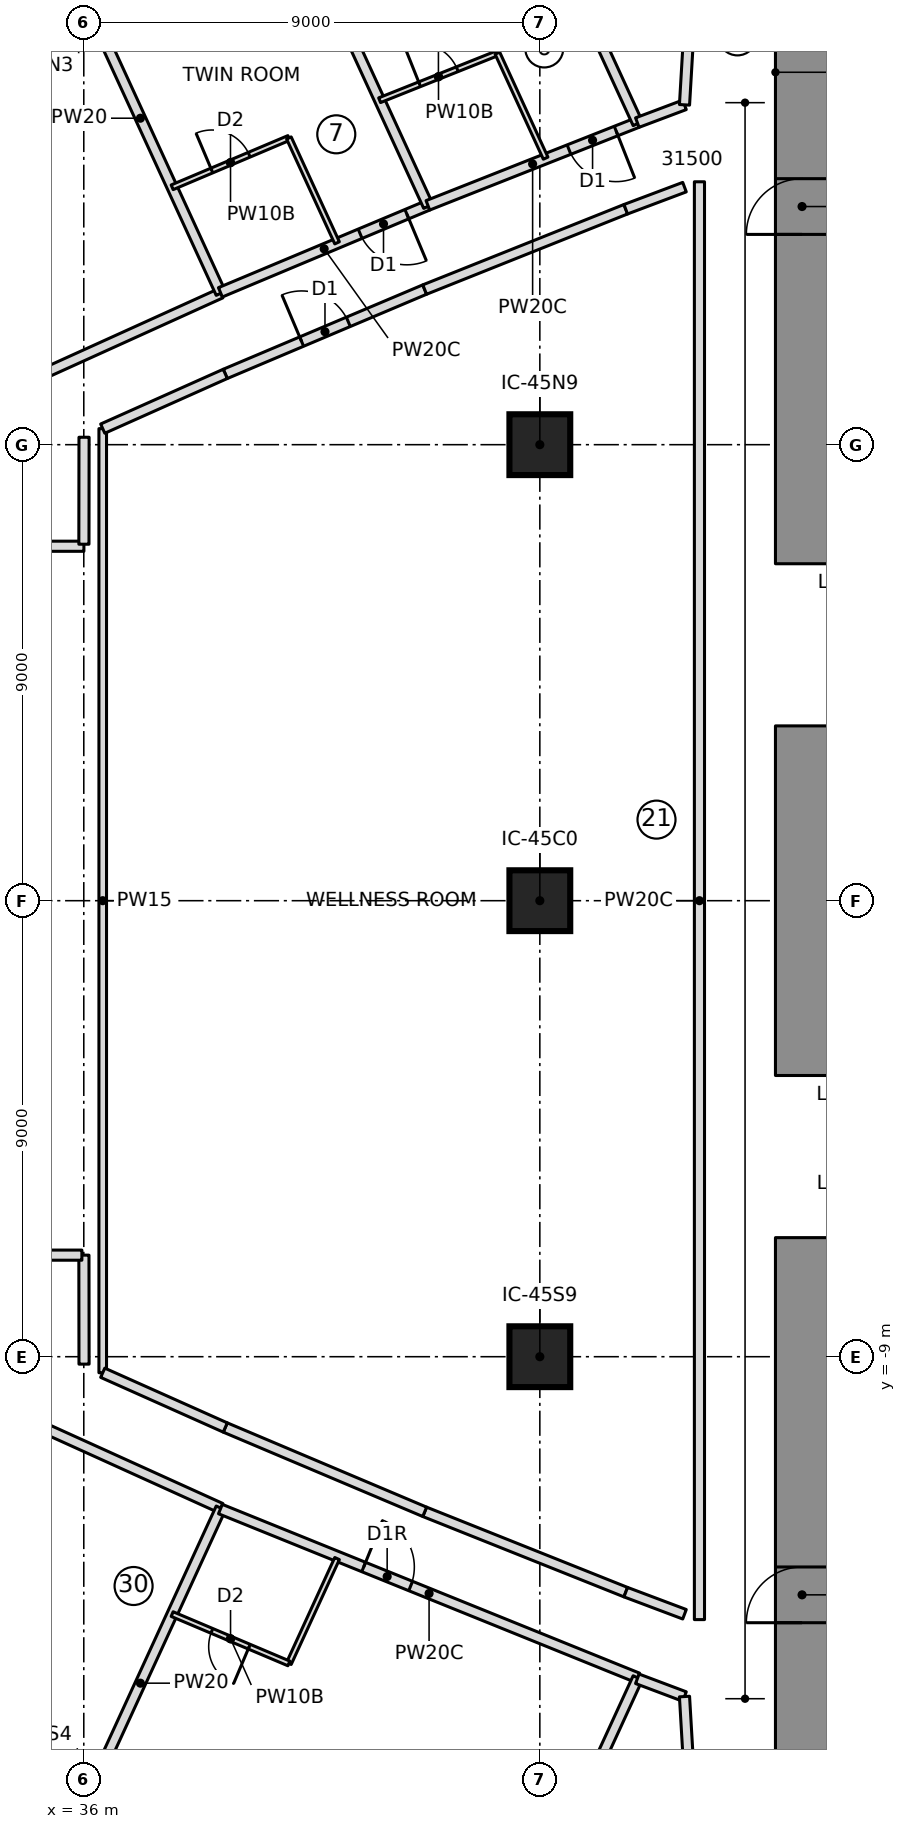
"""IFC4 building model, lengths in metres.
Left out: names, types, materials, properties, quantities, classifications, styles, units other than length and angle.
Written with IfcOpenShell. Run it as: python <this file> out.ifc"""

import sys

from ifc_helpers import new_model, si_unit, direction, frame, frame_2d, origin, origin_2d, place, context, subcontext, project, spatial, rectangle, extrude, element, fill, save


model = new_model("IFC4")
c1 = context("Model", 3, precision=1e-05, world=origin(), true_north=direction((0.0, 1.0)))
c2 = subcontext(c1, "Body", "Model", "MODEL_VIEW")
j1 = project(units=[si_unit("LENGTHUNIT", "METRE"), si_unit("PLANEANGLEUNIT", "RADIAN")], contexts=[c1])
p1 = place(None, origin())
s1 = spatial("IfcSite", under=j1, at=p1, CompositionType="ELEMENT")
p2 = place(p1, origin())
s2 = spatial("IfcBuilding", under=s1, at=p2, CompositionType="ELEMENT")
p3 = place(p2, frame((0.0, 0.0, 95.55)))
s3 = spatial("IfcBuildingStorey", under=s2, at=p3, CompositionType="ELEMENT", Elevation=95.55)
p4 = place(p3, frame((50.175, 6.65, 0.0), z_axis=(0.0, 0.0, 1.0), x_axis=(0.0, 1.0, 0.0)))
e1 = element("IfcWall", 1, at=p4, inside=s3, PredefinedType="SHEAR", context=c2, shape_type="SweptSolid", body=[
    extrude(rectangle(XDim=10.15, YDim=1.05, at=frame_2d((5.075, 0.0))), origin(), (0.0, 0.0, 1.0), 3.55),
])
p5 = place(p4, frame((6.5, 0.0, 0.0)))
e2 = element("IfcOpeningElement", 2, at=p5, cuts=e1, PredefinedType="OPENING", context=c2, shape_type="SweptSolid", body=[
    extrude(rectangle(XDim=1.1, YDim=2.1, at=frame_2d((0.55, 1.05))), frame((0.0, 0.535, 0.0), z_axis=(0.0, -1.0, 0.0), x_axis=(1.0, 0.0, 0.0)), (0.0, 0.0, 1.0), 1.07),
])
p6 = place(p3, frame((50.175, -3.45, 0.0), z_axis=(0.0, 0.0, 1.0), x_axis=(0.0, 1.0, 0.0)))
e3 = element("IfcWall", 3, at=p6, inside=s3, PredefinedType="SHEAR", context=c2, shape_type="SweptSolid", body=[
    extrude(rectangle(XDim=6.9, YDim=1.05, at=frame_2d((3.45, 0.0))), origin(), (0.0, 0.0, 1.0), 3.55),
])
p7 = place(p3, frame((50.175, -16.8, 0.0), z_axis=(0.0, 0.0, 1.0), x_axis=(0.0, 1.0, 0.0)))
e4 = element("IfcWall", 4, at=p7, inside=s3, PredefinedType="SHEAR", context=c2, shape_type="SweptSolid", body=[
    extrude(rectangle(XDim=10.15, YDim=1.05, at=frame_2d((5.075, 0.0))), origin(), (0.0, 0.0, 1.0), 3.55),
])
p8 = place(p7, frame((2.55, 0.0, 0.0)))
e5 = element("IfcOpeningElement", 5, at=p8, cuts=e4, PredefinedType="OPENING", context=c2, shape_type="SweptSolid", body=[
    extrude(rectangle(XDim=1.1, YDim=2.1, at=frame_2d((0.55, 1.05))), frame((0.0, 0.535, 0.0), z_axis=(0.0, -1.0, 0.0), x_axis=(1.0, 0.0, 0.0)), (0.0, 0.0, 1.0), 1.07),
])
for number, where, z_axis, x_axis in (
    (6, (45.0, -9.0, 0.0), (0.0, 0.0, 1.0), (1.0, 0.0, 0.0)),
    (7, (45.0, 0.0, 0.0), (0.0, 0.0, 1.0), (1.0, 0.0, 0.0)),
    (8, (45.0, 9.0, 0.0), (0.0, 0.0, 1.0), (1.0, 0.0, 0.0)),
):
    element("IfcColumn", number, at=place(p3, frame(where, z_axis=z_axis, x_axis=x_axis)), inside=s3, PredefinedType="COLUMN", context=c2, shape_type="SweptSolid", body=[
        extrude(rectangle(XDim=1.2, YDim=1.2, at=origin_2d()), origin(), (0.0, 0.0, 1.0), 3.55),
    ])
p9 = place(p3, frame((30.614, 8.32, 0.0), z_axis=(0.0, 0.0, 1.0), x_axis=(0.910751030363, 0.41295588226, 0.0)))
e9 = element("IfcWall", 9, at=p9, inside=s3, PredefinedType="PARTITIONING", context=c2, shape_type="SweptSolid", body=[
    extrude(rectangle(XDim=8.883, YDim=0.2, at=frame_2d((4.442, 0.0))), origin(), (0.0, 0.0, 1.0), 3.25),
])
p10 = place(p9, frame((0.45, 0.0, 0.0)))
e10 = element("IfcOpeningElement", 10, at=p10, cuts=e9, PredefinedType="OPENING", context=c2, shape_type="SweptSolid", body=[
    extrude(rectangle(XDim=1.0, YDim=2.1, at=frame_2d((0.5, 1.05))), frame((0.0, 0.11, 0.0), z_axis=(0.0, -1.0, 0.0), x_axis=(1.0, 0.0, 0.0)), (0.0, 0.0, 1.0), 0.22),
])
p11 = place(p3, frame((38.704, 11.989, 0.0), z_axis=(0.0, 0.0, 1.0), x_axis=(-0.417416334044, 0.908715359215, 0.0)))
e11 = element("IfcWall", 11, at=p11, inside=s3, PredefinedType="PARTITIONING", context=c2, shape_type="SweptSolid", body=[
    extrude(rectangle(XDim=7.604, YDim=0.2, at=frame_2d((3.802, 0.0))), origin(), (0.0, 0.0, 1.0), 3.25),
])
p12 = place(p3, frame((42.791, 13.724, 0.0), z_axis=(0.0, 0.0, 1.0), x_axis=(-0.922230433067, -0.386640696675, 0.0)))
e12 = element("IfcWall", 12, at=p12, inside=s3, PredefinedType="PARTITIONING", context=c2, shape_type="SweptSolid", body=[
    extrude(rectangle(XDim=4.44, YDim=0.2, at=frame_2d((2.22, 0.0))), origin(), (0.0, 0.0, 1.0), 3.25),
])
p13 = place(p12, frame((0.45, 0.0, 0.0)))
e13 = element("IfcOpeningElement", 13, at=p13, cuts=e12, PredefinedType="OPENING", context=c2, shape_type="SweptSolid", body=[
    extrude(rectangle(XDim=1.0, YDim=2.1, at=frame_2d((0.5, 1.05))), frame((0.0, 0.11, 0.0), z_axis=(0.0, -1.0, 0.0), x_axis=(1.0, 0.0, 0.0)), (0.0, 0.0, 1.0), 0.22),
])
p14 = place(p3, frame((37.744, 14.08, 0.0), z_axis=(0.0, 0.0, 1.0), x_axis=(0.921042675983, 0.38946166566, 0.0)))
e14 = element("IfcWall", 14, at=p14, inside=s3, PredefinedType="PARTITIONING", context=c2, shape_type="SweptSolid", body=[
    extrude(rectangle(XDim=2.501, YDim=0.1, at=frame_2d((1.25, 0.0))), origin(), (0.0, 0.0, 1.0), 3.25),
])
p15 = place(p14, frame((0.85, 0.0, 0.0)))
e15 = element("IfcOpeningElement", 15, at=p15, cuts=e14, PredefinedType="OPENING", context=c2, shape_type="SweptSolid", body=[
    extrude(rectangle(XDim=0.8, YDim=2.1, at=frame_2d((0.4, 1.05))), frame((0.0, 0.06, 0.0), z_axis=(0.0, -1.0, 0.0), x_axis=(1.0, 0.0, 0.0)), (0.0, 0.0, 1.0), 0.12),
])
p16 = place(p3, frame((40.048, 15.054, 0.0), z_axis=(0.0, 0.0, 1.0), x_axis=(0.417433204355, -0.908707609686, 0.0)))
e16 = element("IfcWall", 16, at=p16, inside=s3, PredefinedType="PARTITIONING", context=c2, shape_type="SweptSolid", body=[
    extrude(rectangle(XDim=2.278, YDim=0.1, at=frame_2d((1.139, 0.0))), origin(), (0.0, 0.0, 1.0), 3.25),
])
p17 = place(p3, frame((42.799, 13.705, 0.0), z_axis=(0.0, 0.0, 1.0), x_axis=(-0.417427858403, 0.908710065438, 0.0)))
e17 = element("IfcWall", 17, at=p17, inside=s3, PredefinedType="PARTITIONING", context=c2, shape_type="SweptSolid", body=[
    extrude(rectangle(XDim=7.61, YDim=0.2, at=frame_2d((3.805, 0.0))), origin(), (0.0, 0.0, 1.0), 3.25),
])
p18 = place(p3, frame((46.924, 15.357, 0.0), z_axis=(0.0, 0.0, 1.0), x_axis=(-0.930040633249, -0.367456692014, 0.0)))
e18 = element("IfcWall", 18, at=p18, inside=s3, PredefinedType="PARTITIONING", context=c2, shape_type="SweptSolid", body=[
    extrude(rectangle(XDim=4.444, YDim=0.2, at=frame_2d((2.222, 0.0))), origin(), (0.0, 0.0, 1.0), 3.25),
])
p19 = place(p18, frame((0.45, 0.0, 0.0)))
e19 = element("IfcOpeningElement", 19, at=p19, cuts=e18, PredefinedType="OPENING", context=c2, shape_type="SweptSolid", body=[
    extrude(rectangle(XDim=1.0, YDim=2.1, at=frame_2d((0.5, 1.05))), frame((0.0, 0.11, 0.0), z_axis=(0.0, -1.0, 0.0), x_axis=(1.0, 0.0, 0.0)), (0.0, 0.0, 1.0), 0.22),
])
p20 = place(p3, frame((41.838, 15.798, 0.0), z_axis=(0.0, 0.0, 1.0), x_axis=(0.928638024739, 0.370987087388, 0.0)))
e20 = element("IfcWall", 20, at=p20, inside=s3, PredefinedType="PARTITIONING", context=c2, shape_type="SweptSolid", body=[
    extrude(rectangle(XDim=2.503, YDim=0.1, at=frame_2d((1.252, 0.0))), origin(), (0.0, 0.0, 1.0), 3.25),
])
p21 = place(p20, frame((0.85, 0.0, 0.0)))
e21 = element("IfcOpeningElement", 21, at=p21, cuts=e20, PredefinedType="OPENING", context=c2, shape_type="SweptSolid", body=[
    extrude(rectangle(XDim=0.8, YDim=2.1, at=frame_2d((0.4, 1.05))), frame((0.0, 0.06, 0.0), z_axis=(0.0, -1.0, 0.0), x_axis=(1.0, 0.0, 0.0)), (0.0, 0.0, 1.0), 0.12),
])
p22 = place(p3, frame((44.163, 16.727, 0.0), z_axis=(0.0, 0.0, 1.0), x_axis=(0.417373525971, -0.908735021785, 0.0)))
e22 = element("IfcWall", 22, at=p22, inside=s3, PredefinedType="PARTITIONING", context=c2, shape_type="SweptSolid", body=[
    extrude(rectangle(XDim=2.28, YDim=0.1, at=frame_2d((1.14, 0.0))), origin(), (0.0, 0.0, 1.0), 3.25),
])
p23 = place(p3, frame((46.933, 15.339, 0.0), z_axis=(0.0, 0.0, 1.0), x_axis=(-0.417437957167, 0.908705426371, 0.0)))
e23 = element("IfcWall", 23, at=p23, inside=s3, PredefinedType="PARTITIONING", context=c2, shape_type="SweptSolid", body=[
    extrude(rectangle(XDim=7.619, YDim=0.2, at=frame_2d((3.81, 0.0))), origin(), (0.0, 0.0, 1.0), 3.25),
])
p24 = place(p3, frame((30.614, -8.32, 0.0), z_axis=(0.0, 0.0, 1.0), x_axis=(0.910751030363, -0.41295588226, 0.0)))
e24 = element("IfcWall", 24, at=p24, inside=s3, PredefinedType="PARTITIONING", context=c2, shape_type="SweptSolid", body=[
    extrude(rectangle(XDim=8.883, YDim=0.2, at=frame_2d((4.442, 0.0))), origin(), (0.0, 0.0, 1.0), 3.25),
])
p25 = place(p24, frame((0.45, 0.0, 0.0)))
e25 = element("IfcOpeningElement", 25, at=p25, cuts=e24, PredefinedType="OPENING", context=c2, shape_type="SweptSolid", body=[
    extrude(rectangle(XDim=1.0, YDim=2.1, at=frame_2d((0.5, 1.05))), frame((0.0, 0.11, 0.0), z_axis=(0.0, -1.0, 0.0), x_axis=(1.0, 0.0, 0.0)), (0.0, 0.0, 1.0), 0.22),
])
p26 = place(p3, frame((35.531, -18.898, 0.0), z_axis=(0.0, 0.0, 1.0), x_axis=(0.417416334044, 0.908715359215, 0.0)))
e26 = element("IfcWall", 26, at=p26, inside=s3, PredefinedType="PARTITIONING", context=c2, shape_type="SweptSolid", body=[
    extrude(rectangle(XDim=7.604, YDim=0.2, at=frame_2d((3.802, 0.0))), origin(), (0.0, 0.0, 1.0), 3.25),
])
p27 = place(p3, frame((38.696, -12.007, 0.0), z_axis=(0.0, 0.0, 1.0), x_axis=(0.927027566285, -0.374993188401, 0.0)))
e27 = element("IfcWall", 27, at=p27, inside=s3, PredefinedType="PARTITIONING", context=c2, shape_type="SweptSolid", body=[
    extrude(rectangle(XDim=8.885, YDim=0.2, at=frame_2d((4.442, 0.0))), origin(), (0.0, 0.0, 1.0), 3.25),
])
p28 = place(p27, frame((3.05, 0.0, 0.0)))
e28 = element("IfcOpeningElement", 28, at=p28, cuts=e27, PredefinedType="OPENING", context=c2, shape_type="SweptSolid", body=[
    extrude(rectangle(XDim=1.0, YDim=2.1, at=frame_2d((0.5, 1.05))), frame((0.0, 0.11, 0.0), z_axis=(0.0, -1.0, 0.0), x_axis=(1.0, 0.0, 0.0)), (0.0, 0.0, 1.0), 0.22),
])
p29 = place(p3, frame((40.999, -12.984, 0.0), z_axis=(0.0, 0.0, 1.0), x_axis=(-0.417433204355, -0.908707609686, 0.0)))
e29 = element("IfcWall", 29, at=p29, inside=s3, PredefinedType="PARTITIONING", context=c2, shape_type="SweptSolid", body=[
    extrude(rectangle(XDim=2.278, YDim=0.1, at=frame_2d((1.139, 0.0))), origin(), (0.0, 0.0, 1.0), 3.25),
])
p30 = place(p3, frame((40.048, -15.054, 0.0), z_axis=(0.0, 0.0, 1.0), x_axis=(-0.921042675983, 0.38946166566, 0.0)))
e30 = element("IfcWall", 30, at=p30, inside=s3, PredefinedType="PARTITIONING", context=c2, shape_type="SweptSolid", body=[
    extrude(rectangle(XDim=2.501, YDim=0.1, at=frame_2d((1.25, 0.0))), origin(), (0.0, 0.0, 1.0), 3.25),
])
p31 = place(p30, frame((0.85, 0.0, 0.0)))
e31 = element("IfcOpeningElement", 31, at=p31, cuts=e30, PredefinedType="OPENING", context=c2, shape_type="SweptSolid", body=[
    extrude(rectangle(XDim=0.8, YDim=2.1, at=frame_2d((0.4, 1.05))), frame((0.0, 0.06, 0.0), z_axis=(0.0, -1.0, 0.0), x_axis=(1.0, 0.0, 0.0)), (0.0, 0.0, 1.0), 0.12),
])
p32 = place(p3, frame((43.752, -22.262, 0.0), z_axis=(0.0, 0.0, 1.0), x_axis=(0.417437957167, 0.908705426371, 0.0)))
e32 = element("IfcWall", 32, at=p32, inside=s3, PredefinedType="PARTITIONING", context=c2, shape_type="SweptSolid", body=[
    extrude(rectangle(XDim=7.619, YDim=0.2, at=frame_2d((3.81, 0.0))), origin(), (0.0, 0.0, 1.0), 3.25),
])
p33 = place(p3, frame((36.374, -9.317, 0.0), z_axis=(0.0, 0.0, 1.0), x_axis=(0.0, 1.0, 0.0)))
e33 = element("IfcWall", 33, at=p33, inside=s3, PredefinedType="PARTITIONING", context=c2, shape_type="SweptSolid", body=[
    extrude(rectangle(XDim=18.634, YDim=0.15, at=frame_2d((9.317, 0.0))), origin(), (0.0, 0.0, 1.0), 3.25),
])
p34 = place(p3, frame((38.792, 10.397, 0.0), z_axis=(0.0, 0.0, 1.0), x_axis=(0.921037415532, 0.389474105929, 0.0)))
e34 = element("IfcWall", 34, at=p34, inside=s3, PredefinedType="PARTITIONING", context=c2, shape_type="SweptSolid", body=[
    extrude(rectangle(XDim=4.273, YDim=0.2, at=frame_2d((2.137, 0.0))), origin(), (0.0, 0.0, 1.0), 3.25),
])
p35 = place(p34, frame((1.636, 0.0, 0.0)))
e35 = element("IfcOpeningElement", 35, at=p35, cuts=e34, PredefinedType="OPENING", context=c2, shape_type="SweptSolid", body=[
    extrude(rectangle(XDim=1.0, YDim=2.1, at=frame_2d((0.5, 1.05))), frame((0.0, 0.11, 0.0), z_axis=(0.0, -1.0, 0.0), x_axis=(1.0, 0.0, 0.0)), (0.0, 0.0, 1.0), 0.22),
])
for number, where, z_axis, x_axis in (
    (36, (42.728, 12.062, 0.0), (0.0, 0.0, 1.0), (0.929, 0.371, 0.0)),
    (37, (46.696, -13.647, 0.0), (0.0, 0.0, 1.0), (-0.929, 0.371, 0.0)),
):
    element("IfcWall", number, at=place(p3, frame(where, z_axis=z_axis, x_axis=x_axis)), inside=s3, PredefinedType="PARTITIONING", context=c2, shape_type="SweptSolid", body=[
        extrude(rectangle(XDim=4.273, YDim=0.2, at=frame_2d((2.136, 0.0))), origin(), (0.0, 0.0, 1.0), 3.25),
    ])
p36 = place(p3, frame((42.728, -12.062, 0.0), z_axis=(0.0, 0.0, 1.0), x_axis=(-0.921037415532, 0.389474105929, 0.0)))
e38 = element("IfcWall", 38, at=p36, inside=s3, PredefinedType="PARTITIONING", context=c2, shape_type="SweptSolid", body=[
    extrude(rectangle(XDim=4.273, YDim=0.2, at=frame_2d((2.137, 0.0))), origin(), (0.0, 0.0, 1.0), 3.25),
])
for number, where, z_axis, x_axis in (
    (39, (38.792, -10.397, 0.0), (0.0, 0.0, 1.0), (-0.913, 0.408, 0.0)),
    (40, (36.374, 9.317, 0.0), (0.0, 0.0, 1.0), (0.913, 0.408, 0.0)),
):
    element("IfcWall", number, at=place(p3, frame(where, z_axis=z_axis, x_axis=x_axis)), inside=s3, PredefinedType="PARTITIONING", context=c2, shape_type="SweptSolid", body=[
        extrude(rectangle(XDim=2.648, YDim=0.2, at=frame_2d((1.324, 0.0))), origin(), (0.0, 0.0, 1.0), 3.25),
    ])
for number, where, z_axis, x_axis in (
    (41, (47.855, 15.707, 0.0), (0.0, 0.0, 1.0), (-0.936, -0.353, 0.0)),
    (42, (46.924, -15.357, 0.0), (0.0, 0.0, 1.0), (0.936, -0.353, 0.0)),
):
    element("IfcWall", number, at=place(p3, frame(where, z_axis=z_axis, x_axis=x_axis)), inside=s3, PredefinedType="PARTITIONING", context=c2, shape_type="SweptSolid", body=[
        extrude(rectangle(XDim=0.995, YDim=0.2, at=frame_2d((0.497, 0.0))), origin(), (0.0, 0.0, 1.0), 3.25),
    ])
for number, where, z_axis, x_axis in (
    (43, (46.696, 13.647, 0.0), (0.0, 0.0, 1.0), (0.936, 0.352, 0.0)),
    (44, (47.855, -14.083, 0.0), (0.0, 0.0, 1.0), (-0.936, 0.352, 0.0)),
):
    element("IfcWall", number, at=place(p3, frame(where, z_axis=z_axis, x_axis=x_axis)), inside=s3, PredefinedType="PARTITIONING", context=c2, shape_type="SweptSolid", body=[
        extrude(rectangle(XDim=1.239, YDim=0.2, at=frame_2d((0.619, 0.0))), origin(), (0.0, 0.0, 1.0), 3.25),
    ])
p37 = place(p3, frame((48.146, 20.652, 0.0), z_axis=(0.0, 0.0, 1.0), x_axis=(-0.058649792989, -0.998278619315, 0.0)))
e45 = element("IfcWall", 45, at=p37, inside=s3, PredefinedType="PARTITIONING", context=c2, shape_type="SweptSolid", body=[
    extrude(rectangle(XDim=4.954, YDim=0.2, at=frame_2d((2.477, 0.0))), origin(), (0.0, 0.0, 1.0), 3.25),
])
p38 = place(p37, frame((1.977, 0.0, 0.0)))
e46 = element("IfcOpeningElement", 46, at=p38, cuts=e45, PredefinedType="OPENING", context=c2, shape_type="SweptSolid", body=[
    extrude(rectangle(XDim=1.0, YDim=2.1, at=frame_2d((0.5, 1.05))), frame((0.0, 0.11, 0.0), z_axis=(0.0, -1.0, 0.0), x_axis=(1.0, 0.0, 0.0)), (0.0, 0.0, 1.0), 0.22),
])
p39 = place(p3, frame((47.855, -15.707, 0.0), z_axis=(0.0, 0.0, 1.0), x_axis=(0.058568850083, -0.998283371493, 0.0)))
e47 = element("IfcWall", 47, at=p39, inside=s3, PredefinedType="PARTITIONING", context=c2, shape_type="SweptSolid", body=[
    extrude(rectangle(XDim=4.952, YDim=0.2, at=frame_2d((2.476, 0.0))), origin(), (0.0, 0.0, 1.0), 3.25),
])
p40 = place(p39, frame((1.976, 0.0, 0.0)))
e48 = element("IfcOpeningElement", 48, at=p40, cuts=e47, PredefinedType="OPENING", context=c2, shape_type="SweptSolid", body=[
    extrude(rectangle(XDim=1.0, YDim=2.1, at=frame_2d((0.5, 1.05))), frame((0.0, 0.11, 0.0), z_axis=(0.0, -1.0, 0.0), x_axis=(1.0, 0.0, 0.0)), (0.0, 0.0, 1.0), 0.22),
])
p41 = place(p3, frame((36.005, -9.146, 0.0), z_axis=(0.0, 0.0, 1.0), x_axis=(-0.001135073049, 0.999999355804, 0.0)))
e49 = element("IfcWall", 49, at=p41, inside=s3, PredefinedType="PARTITIONING", context=c2, shape_type="SweptSolid", body=[
    extrude(rectangle(XDim=2.151, YDim=0.2, at=frame_2d((1.075, 0.0))), origin(), (0.0, 0.0, 1.0), 3.25),
])
p42 = place(p3, frame((35.962, -6.996, 0.0), z_axis=(0.0, 0.0, 1.0), x_axis=(-0.999999992409, 0.000123213405, 0.0)))
e50 = element("IfcWall", 50, at=p42, inside=s3, PredefinedType="PARTITIONING", context=c2, shape_type="SweptSolid", body=[
    extrude(rectangle(XDim=3.963, YDim=0.2, at=frame_2d((1.981, 0.0))), origin(), (0.0, 0.0, 1.0), 3.25),
])
p43 = place(p3, frame((32.0, 6.995, 0.0), z_axis=(0.0, 0.0, 1.0), x_axis=(0.99999999256, 0.00012198097, 0.0)))
e51 = element("IfcWall", 51, at=p43, inside=s3, PredefinedType="PARTITIONING", context=c2, shape_type="SweptSolid", body=[
    extrude(rectangle(XDim=4.003, YDim=0.2, at=frame_2d((2.001, 0.0))), origin(), (0.0, 0.0, 1.0), 3.25),
])
p44 = place(p3, frame((36.002, 7.036, 0.0), z_axis=(0.0, 0.0, 1.0), x_axis=(0.001156603436, 0.999999331134, 0.0)))
e52 = element("IfcWall", 52, at=p44, inside=s3, PredefinedType="PARTITIONING", context=c2, shape_type="SweptSolid", body=[
    extrude(rectangle(XDim=2.111, YDim=0.2, at=frame_2d((1.055, 0.0))), origin(), (0.0, 0.0, 1.0), 3.25),
])
p45 = place(p3, frame((48.15, 14.189, 0.0), z_axis=(0.0, 0.0, 1.0), x_axis=(0.0, -1.0, 0.0)))
e53 = element("IfcWall", 53, at=p45, inside=s3, PredefinedType="PARTITIONING", context=c2, shape_type="SweptSolid", body=[
    extrude(rectangle(XDim=28.377, YDim=0.2, at=frame_2d((14.189, 0.0))), origin(), (0.0, 0.0, 1.0), 3.25),
])
p46 = place(p15, origin())
e54 = element("IfcDoor", 54, at=p46, inside=s3, OperationType="SINGLE_SWING_LEFT", PredefinedType="DOOR", context=c2, shape_type="SweptSolid", body=[
    extrude(rectangle(XDim=0.8, YDim=2.1, at=frame_2d((0.4, 1.05))), frame((0.0, 0.025, 0.0), z_axis=(0.0, -1.0, 0.0), x_axis=(1.0, 0.0, 0.0)), (0.0, 0.0, 1.0), 0.05),
])
fill(e15, e54)
p47 = place(p13, origin())
e55 = element("IfcDoor", 55, at=p47, inside=s3, OperationType="SINGLE_SWING_LEFT", PredefinedType="DOOR", context=c2, shape_type="SweptSolid", body=[
    extrude(rectangle(XDim=1.0, YDim=2.1, at=frame_2d((0.5, 1.05))), frame((0.0, 0.025, 0.0), z_axis=(0.0, -1.0, 0.0), x_axis=(1.0, 0.0, 0.0)), (0.0, 0.0, 1.0), 0.05),
])
fill(e13, e55)
p48 = place(p21, origin())
e56 = element("IfcDoor", 56, at=p48, inside=s3, OperationType="SINGLE_SWING_LEFT", PredefinedType="DOOR", context=c2, shape_type="SweptSolid", body=[
    extrude(rectangle(XDim=0.8, YDim=2.1, at=frame_2d((0.4, 1.05))), frame((0.0, 0.025, 0.0), z_axis=(0.0, -1.0, 0.0), x_axis=(1.0, 0.0, 0.0)), (0.0, 0.0, 1.0), 0.05),
])
fill(e21, e56)
p49 = place(p19, origin())
e57 = element("IfcDoor", 57, at=p49, inside=s3, OperationType="SINGLE_SWING_LEFT", PredefinedType="DOOR", context=c2, shape_type="SweptSolid", body=[
    extrude(rectangle(XDim=1.0, YDim=2.1, at=frame_2d((0.5, 1.05))), frame((0.0, 0.025, 0.0), z_axis=(0.0, -1.0, 0.0), x_axis=(1.0, 0.0, 0.0)), (0.0, 0.0, 1.0), 0.05),
])
fill(e19, e57)
p50 = place(p31, origin())
e58 = element("IfcDoor", 58, at=p50, inside=s3, OperationType="SINGLE_SWING_LEFT", PredefinedType="DOOR", context=c2, shape_type="SweptSolid", body=[
    extrude(rectangle(XDim=0.8, YDim=2.1, at=frame_2d((0.4, 1.05))), frame((0.0, 0.025, 0.0), z_axis=(0.0, -1.0, 0.0), x_axis=(1.0, 0.0, 0.0)), (0.0, 0.0, 1.0), 0.05),
])
fill(e31, e58)
p51 = place(p28, origin())
e59 = element("IfcDoor", 59, at=p51, inside=s3, OperationType="SINGLE_SWING_RIGHT", PredefinedType="DOOR", context=c2, shape_type="SweptSolid", body=[
    extrude(rectangle(XDim=1.0, YDim=2.1, at=frame_2d((0.5, 1.05))), frame((0.0, 0.025, 0.0), z_axis=(0.0, -1.0, 0.0), x_axis=(1.0, 0.0, 0.0)), (0.0, 0.0, 1.0), 0.05),
])
fill(e28, e59)
p52 = place(p35, origin())
e60 = element("IfcDoor", 60, at=p52, inside=s3, OperationType="SINGLE_SWING_LEFT", PredefinedType="DOOR", context=c2, shape_type="SweptSolid", body=[
    extrude(rectangle(XDim=1.0, YDim=2.1, at=frame_2d((0.5, 1.05))), frame((0.0, 0.025, 0.0), z_axis=(0.0, -1.0, 0.0), x_axis=(1.0, 0.0, 0.0)), (0.0, 0.0, 1.0), 0.05),
])
fill(e35, e60)
p53 = place(p5, origin())
e61 = element("IfcDoor", 61, at=p53, inside=s3, OperationType="SINGLE_SWING_RIGHT", PredefinedType="DOOR", context=c2, shape_type="SweptSolid", body=[
    extrude(rectangle(XDim=1.1, YDim=2.1, at=frame_2d((0.55, 1.05))), frame((0.0, 0.025, 0.0), z_axis=(0.0, -1.0, 0.0), x_axis=(1.0, 0.0, 0.0)), (0.0, 0.0, 1.0), 0.05),
])
fill(e2, e61)
p54 = place(p8, origin())
e62 = element("IfcDoor", 62, at=p54, inside=s3, OperationType="SINGLE_SWING_RIGHT", PredefinedType="DOOR", context=c2, shape_type="SweptSolid", body=[
    extrude(rectangle(XDim=1.1, YDim=2.1, at=frame_2d((0.55, 1.05))), frame((0.0, 0.025, 0.0), z_axis=(0.0, -1.0, 0.0), x_axis=(1.0, 0.0, 0.0)), (0.0, 0.0, 1.0), 0.05),
])
fill(e5, e62)
save(model, sys.argv[1])
